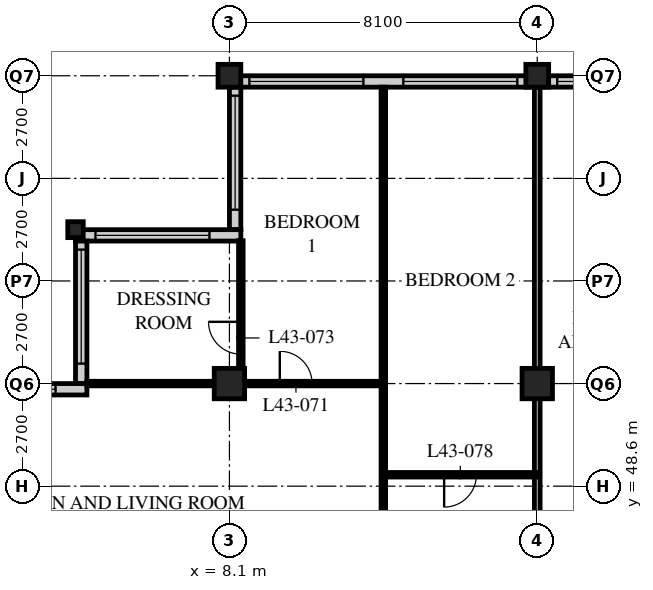
"""IFC4 building model, lengths in metres.
Left out: names, types, materials, properties, quantities, classifications, styles, units other than length and angle.
Written with IfcOpenShell. Run it as: python <this file> out.ifc"""

import sys

from ifc_helpers import new_model, si_unit, direction, frame, frame_2d, origin, origin_2d, place, context, subcontext, project, spatial, rectangle, hollow_rectangle, i_section, extrude, element, fill, save


model = new_model("IFC4")
c1 = context("Model", 3, precision=1e-05, world=origin(), true_north=direction((0.0, 1.0)))
c2 = subcontext(c1, "Body", "Model", "MODEL_VIEW")
j1 = project(units=[si_unit("LENGTHUNIT", "METRE"), si_unit("PLANEANGLEUNIT", "RADIAN")], contexts=[c1])
p1 = place(None, origin())
s1 = spatial("IfcSite", under=j1, at=p1, CompositionType="ELEMENT")
p2 = place(p1, origin())
s2 = spatial("IfcBuilding", under=s1, at=p2, CompositionType="ELEMENT")
p3 = place(p2, frame((0.0, 0.0, 170.4)))
s3 = spatial("IfcBuildingStorey", under=s2, at=p3, CompositionType="ELEMENT", Elevation=170.4)
p4 = place(p3, frame((4.05, 55.35, 0.0), z_axis=(0.0, 0.0, 1.0), x_axis=(1.0, 0.0, 0.0)))
e1 = element("IfcColumn", 1, at=p4, inside=s3, PredefinedType="COLUMN", context=c2, shape_type="SweptSolid", body=[
    extrude(i_section(OverallWidth=0.407, OverallDepth=0.419, WebThickness=0.031, FlangeThickness=0.049, FilletRadius=0.015, at=origin_2d()), origin(), (0.0, 0.0, 1.0), 3.6),
])
p5 = place(p3, frame((8.1, 51.3, 0.0), z_axis=(0.0, 0.0, 1.0), x_axis=(1.0, 0.0, 0.0)))
e2 = element("IfcColumn", 2, at=p5, inside=s3, PredefinedType="COLUMN", context=c2, shape_type="SweptSolid", body=[
    extrude(hollow_rectangle(XDim=0.8, YDim=0.8, WallThickness=0.08, at=origin_2d()), origin(), (0.0, 0.0, 1.0), 3.6),
])
p6 = place(p3, frame((8.1, 59.4, 0.0), z_axis=(0.0, 0.0, 1.0), x_axis=(1.0, 0.0, 0.0)))
e3 = element("IfcColumn", 3, at=p6, inside=s3, PredefinedType="COLUMN", context=c2, shape_type="SweptSolid", body=[
    extrude(hollow_rectangle(XDim=0.6, YDim=0.6, WallThickness=0.05, at=origin_2d()), origin(), (0.0, 0.0, 1.0), 3.6),
])
p7 = place(p3, frame((16.2, 51.3, 0.0), z_axis=(0.0, 0.0, 1.0), x_axis=(1.0, 0.0, 0.0)))
e4 = element("IfcColumn", 4, at=p7, inside=s3, PredefinedType="COLUMN", context=c2, shape_type="SweptSolid", body=[
    extrude(hollow_rectangle(XDim=0.8, YDim=0.8, WallThickness=0.08, at=origin_2d()), origin(), (0.0, 0.0, 1.0), 3.6),
])
p8 = place(p3, frame((16.2, 59.4, 0.0), z_axis=(0.0, 0.0, 1.0), x_axis=(1.0, 0.0, 0.0)))
e5 = element("IfcColumn", 5, at=p8, inside=s3, PredefinedType="COLUMN", context=c2, shape_type="SweptSolid", body=[
    extrude(hollow_rectangle(XDim=0.6, YDim=0.6, WallThickness=0.05, at=origin_2d()), origin(), (0.0, 0.0, 1.0), 3.6),
])
p9 = place(p3, frame((48.3, 59.25, 0.0), z_axis=(0.0, 0.0, 1.0), x_axis=(-1.0, 0.0, 0.0)))
e6 = element("IfcWall", 6, at=p9, inside=s3, PredefinedType="SOLIDWALL", context=c2, shape_type="SweptSolid", body=[
    extrude(rectangle(XDim=40.2, YDim=0.3, at=frame_2d((20.1, 0.0))), origin(), (0.0, 0.0, 1.0), 3.39),
])
p10 = place(p9, frame((0.225, 0.0, 0.6)))
e7 = element("IfcOpeningElement", 7, at=p10, cuts=e6, PredefinedType="OPENING", context=c2, shape_type="SweptSolid", body=[
    extrude(rectangle(XDim=3.0, YDim=2.4, at=frame_2d((1.5, 1.2))), frame((0.0, 0.16, 0.0), z_axis=(0.0, -1.0, 0.0), x_axis=(1.0, 0.0, 0.0)), (0.0, 0.0, 1.0), 0.32),
])
p11 = place(p9, frame((4.275, 0.0, 0.6)))
e8 = element("IfcOpeningElement", 8, at=p11, cuts=e6, PredefinedType="OPENING", context=c2, shape_type="SweptSolid", body=[
    extrude(rectangle(XDim=3.0, YDim=2.4, at=frame_2d((1.5, 1.2))), frame((0.0, 0.16, 0.0), z_axis=(0.0, -1.0, 0.0), x_axis=(1.0, 0.0, 0.0)), (0.0, 0.0, 1.0), 0.32),
])
p12 = place(p9, frame((8.325, 0.0, 0.6)))
e9 = element("IfcOpeningElement", 9, at=p12, cuts=e6, PredefinedType="OPENING", context=c2, shape_type="SweptSolid", body=[
    extrude(rectangle(XDim=3.0, YDim=2.4, at=frame_2d((1.5, 1.2))), frame((0.0, 0.16, 0.0), z_axis=(0.0, -1.0, 0.0), x_axis=(1.0, 0.0, 0.0)), (0.0, 0.0, 1.0), 0.32),
])
p13 = place(p9, frame((12.375, 0.0, 0.6)))
e10 = element("IfcOpeningElement", 10, at=p13, cuts=e6, PredefinedType="OPENING", context=c2, shape_type="SweptSolid", body=[
    extrude(rectangle(XDim=3.0, YDim=2.4, at=frame_2d((1.5, 1.2))), frame((0.0, 0.16, 0.0), z_axis=(0.0, -1.0, 0.0), x_axis=(1.0, 0.0, 0.0)), (0.0, 0.0, 1.0), 0.32),
])
p14 = place(p9, frame((16.425, 0.0, 0.6)))
e11 = element("IfcOpeningElement", 11, at=p14, cuts=e6, PredefinedType="OPENING", context=c2, shape_type="SweptSolid", body=[
    extrude(rectangle(XDim=3.0, YDim=2.4, at=frame_2d((1.5, 1.2))), frame((0.0, 0.16, 0.0), z_axis=(0.0, -1.0, 0.0), x_axis=(1.0, 0.0, 0.0)), (0.0, 0.0, 1.0), 0.32),
])
p15 = place(p9, frame((20.475, 0.0, 0.6)))
e12 = element("IfcOpeningElement", 12, at=p15, cuts=e6, PredefinedType="OPENING", context=c2, shape_type="SweptSolid", body=[
    extrude(rectangle(XDim=3.0, YDim=2.4, at=frame_2d((1.5, 1.2))), frame((0.0, 0.16, 0.0), z_axis=(0.0, -1.0, 0.0), x_axis=(1.0, 0.0, 0.0)), (0.0, 0.0, 1.0), 0.32),
])
p16 = place(p9, frame((24.525, 0.0, 0.6)))
e13 = element("IfcOpeningElement", 13, at=p16, cuts=e6, PredefinedType="OPENING", context=c2, shape_type="SweptSolid", body=[
    extrude(rectangle(XDim=3.0, YDim=2.4, at=frame_2d((1.5, 1.2))), frame((0.0, 0.16, 0.0), z_axis=(0.0, -1.0, 0.0), x_axis=(1.0, 0.0, 0.0)), (0.0, 0.0, 1.0), 0.32),
])
p17 = place(p9, frame((28.575, 0.0, 0.6)))
e14 = element("IfcOpeningElement", 14, at=p17, cuts=e6, PredefinedType="OPENING", context=c2, shape_type="SweptSolid", body=[
    extrude(rectangle(XDim=3.0, YDim=2.4, at=frame_2d((1.5, 1.2))), frame((0.0, 0.16, 0.0), z_axis=(0.0, -1.0, 0.0), x_axis=(1.0, 0.0, 0.0)), (0.0, 0.0, 1.0), 0.32),
])
p18 = place(p9, frame((32.625, 0.0, 0.6)))
e15 = element("IfcOpeningElement", 15, at=p18, cuts=e6, PredefinedType="OPENING", context=c2, shape_type="SweptSolid", body=[
    extrude(rectangle(XDim=3.0, YDim=2.4, at=frame_2d((1.5, 1.2))), frame((0.0, 0.16, 0.0), z_axis=(0.0, -1.0, 0.0), x_axis=(1.0, 0.0, 0.0)), (0.0, 0.0, 1.0), 0.32),
])
p19 = place(p9, frame((36.675, 0.0, 0.6)))
e16 = element("IfcOpeningElement", 16, at=p19, cuts=e6, PredefinedType="OPENING", context=c2, shape_type="SweptSolid", body=[
    extrude(rectangle(XDim=3.0, YDim=2.4, at=frame_2d((1.5, 1.2))), frame((0.0, 0.16, 0.0), z_axis=(0.0, -1.0, 0.0), x_axis=(1.0, 0.0, 0.0)), (0.0, 0.0, 1.0), 0.32),
])
p20 = place(p3, frame((8.25, 59.1, 0.0), z_axis=(0.0, 0.0, 1.0), x_axis=(0.0, -1.0, 0.0)))
e17 = element("IfcWall", 17, at=p20, inside=s3, PredefinedType="SOLIDWALL", context=c2, shape_type="SweptSolid", body=[
    extrude(rectangle(XDim=3.75, YDim=0.3, at=frame_2d((1.875, 0.0))), origin(), (0.0, 0.0, 1.0), 3.39),
])
p21 = place(p20, frame((0.225, 0.0, 0.6)))
e18 = element("IfcOpeningElement", 18, at=p21, cuts=e17, PredefinedType="OPENING", context=c2, shape_type="SweptSolid", body=[
    extrude(rectangle(XDim=3.0, YDim=2.0, at=frame_2d((1.5, 1.0))), frame((0.0, 0.16, 0.0), z_axis=(0.0, -1.0, 0.0), x_axis=(1.0, 0.0, 0.0)), (0.0, 0.0, 1.0), 0.32),
])
p22 = place(p3, frame((8.4, 55.2, 0.0), z_axis=(0.0, 0.0, 1.0), x_axis=(-1.0, 0.0, 0.0)))
e19 = element("IfcWall", 19, at=p22, inside=s3, PredefinedType="SOLIDWALL", context=c2, shape_type="SweptSolid", body=[
    extrude(rectangle(XDim=4.35, YDim=0.3, at=frame_2d((2.175, 0.0))), origin(), (0.0, 0.0, 1.0), 3.39),
])
p23 = place(p22, frame((0.825, 0.0, 0.6)))
e20 = element("IfcOpeningElement", 20, at=p23, cuts=e19, PredefinedType="OPENING", context=c2, shape_type="SweptSolid", body=[
    extrude(rectangle(XDim=3.0, YDim=2.0, at=frame_2d((1.5, 1.0))), frame((0.0, 0.16, 0.0), z_axis=(0.0, -1.0, 0.0), x_axis=(1.0, 0.0, 0.0)), (0.0, 0.0, 1.0), 0.32),
])
p24 = place(p3, frame((4.2, 55.05, 0.0), z_axis=(0.0, 0.0, 1.0), x_axis=(0.0, -1.0, 0.0)))
e21 = element("IfcWall", 21, at=p24, inside=s3, PredefinedType="SOLIDWALL", context=c2, shape_type="SweptSolid", body=[
    extrude(rectangle(XDim=3.75, YDim=0.3, at=frame_2d((1.875, 0.0))), origin(), (0.0, 0.0, 1.0), 3.39),
])
p25 = place(p24, frame((0.225, 0.0, 0.6)))
e22 = element("IfcOpeningElement", 22, at=p25, cuts=e21, PredefinedType="OPENING", context=c2, shape_type="SweptSolid", body=[
    extrude(rectangle(XDim=3.0, YDim=2.0, at=frame_2d((1.5, 1.0))), frame((0.0, 0.16, 0.0), z_axis=(0.0, -1.0, 0.0), x_axis=(1.0, 0.0, 0.0)), (0.0, 0.0, 1.0), 0.32),
])
p26 = place(p3, frame((4.35, 51.15, 0.0), z_axis=(0.0, 0.0, 1.0), x_axis=(-1.0, 0.0, 0.0)))
e23 = element("IfcWall", 23, at=p26, inside=s3, PredefinedType="SOLIDWALL", context=c2, shape_type="SweptSolid", body=[
    extrude(rectangle(XDim=4.35, YDim=0.3, at=frame_2d((2.175, 0.0))), origin(), (0.0, 0.0, 1.0), 3.39),
])
p27 = place(p26, frame((0.825, 0.0, 0.6)))
e24 = element("IfcOpeningElement", 24, at=p27, cuts=e23, PredefinedType="OPENING", context=c2, shape_type="SweptSolid", body=[
    extrude(rectangle(XDim=3.0, YDim=2.0, at=frame_2d((1.5, 1.0))), frame((0.0, 0.16, 0.0), z_axis=(0.0, -1.0, 0.0), x_axis=(1.0, 0.0, 0.0)), (0.0, 0.0, 1.0), 0.32),
])
p28 = place(p3, frame((12.15, 45.6, 0.0), z_axis=(0.0, 0.0, 1.0), x_axis=(0.0, 1.0, 0.0)))
e25 = element("IfcWall", 25, at=p28, inside=s3, PredefinedType="PARTITIONING", context=c2, shape_type="SweptSolid", body=[
    extrude(rectangle(XDim=13.5, YDim=0.12, at=frame_2d((6.75, 0.0))), origin(), (0.0, 0.0, 1.0), 3.39),
])
p29 = place(p3, frame((12.15, 51.3, 0.0), z_axis=(0.0, 0.0, 1.0), x_axis=(-1.0, 0.0, 0.0)))
e26 = element("IfcWall", 26, at=p29, inside=s3, PredefinedType="PARTITIONING", context=c2, shape_type="SweptSolid", body=[
    extrude(rectangle(XDim=7.8, YDim=0.12, at=frame_2d((3.9, 0.0))), origin(), (0.0, 0.0, 1.0), 2.778),
])
p30 = place(p29, frame((1.875, 0.0, 0.0)))
e27 = element("IfcOpeningElement", 27, at=p30, cuts=e26, PredefinedType="OPENING", context=c2, shape_type="SweptSolid", body=[
    extrude(rectangle(XDim=0.85, YDim=2.1, at=frame_2d((0.425, 1.05))), frame((0.0, 0.07, 0.0), z_axis=(0.0, -1.0, 0.0), x_axis=(1.0, 0.0, 0.0)), (0.0, 0.0, 1.0), 0.14),
])
p31 = place(p3, frame((16.2, 43.2, 0.0), z_axis=(0.0, 0.0, 1.0), x_axis=(0.0, 1.0, 0.0)))
e28 = element("IfcWall", 28, at=p31, inside=s3, PredefinedType="PARTITIONING", context=c2, shape_type="SweptSolid", body=[
    extrude(rectangle(XDim=15.9, YDim=0.15, at=frame_2d((7.95, 0.0))), origin(), (0.0, 0.0, 1.0), 2.778),
])
p32 = place(p3, frame((8.4, 55.06, 0.0), z_axis=(0.0, 0.0, 1.0), x_axis=(0.0, -1.0, 0.0)))
e29 = element("IfcWall", 29, at=p32, inside=s3, PredefinedType="PARTITIONING", context=c2, shape_type="SweptSolid", body=[
    extrude(rectangle(XDim=3.76, YDim=0.12, at=frame_2d((1.88, 0.0))), origin(), (0.0, 0.0, 1.0), 3.39),
])
p33 = place(p32, frame((2.135, 0.0, 0.0)))
e30 = element("IfcOpeningElement", 30, at=p33, cuts=e29, PredefinedType="OPENING", context=c2, shape_type="SweptSolid", body=[
    extrude(rectangle(XDim=0.85, YDim=2.1, at=frame_2d((0.425, 1.05))), frame((0.0, 0.07, 0.0), z_axis=(0.0, -1.0, 0.0), x_axis=(1.0, 0.0, 0.0)), (0.0, 0.0, 1.0), 0.14),
])
p34 = place(p3, frame((12.15, 48.9, 0.0), z_axis=(0.0, 0.0, 1.0), x_axis=(1.0, 0.0, 0.0)))
e31 = element("IfcWall", 31, at=p34, inside=s3, PredefinedType="PARTITIONING", context=c2, shape_type="SweptSolid", body=[
    extrude(rectangle(XDim=4.05, YDim=0.12, at=frame_2d((2.025, 0.0))), origin(), (0.0, 0.0, 1.0), 3.39),
])
p35 = place(p34, frame((1.6, 0.0, 0.0)))
e32 = element("IfcOpeningElement", 32, at=p35, cuts=e31, PredefinedType="OPENING", context=c2, shape_type="SweptSolid", body=[
    extrude(rectangle(XDim=0.85, YDim=2.1, at=frame_2d((0.425, 1.05))), frame((0.0, 0.07, 0.0), z_axis=(0.0, -1.0, 0.0), x_axis=(1.0, 0.0, 0.0)), (0.0, 0.0, 1.0), 0.14),
])
p36 = place(p17, origin())
e33 = element("IfcWindow", 33, at=p36, inside=s3, PartitioningType="SINGLE_PANEL", PredefinedType="WINDOW", context=c2, shape_type="SweptSolid", body=[
    extrude(rectangle(XDim=3.0, YDim=2.4, at=frame_2d((1.5, 1.2))), frame((0.0, 0.03, 0.0), z_axis=(0.0, -1.0, 0.0), x_axis=(1.0, 0.0, 0.0)), (0.0, 0.0, 1.0), 0.06),
])
fill(e14, e33)
p37 = place(p18, origin())
e34 = element("IfcWindow", 34, at=p37, inside=s3, PartitioningType="SINGLE_PANEL", PredefinedType="WINDOW", context=c2, shape_type="SweptSolid", body=[
    extrude(rectangle(XDim=3.0, YDim=2.4, at=frame_2d((1.5, 1.2))), frame((0.0, 0.03, 0.0), z_axis=(0.0, -1.0, 0.0), x_axis=(1.0, 0.0, 0.0)), (0.0, 0.0, 1.0), 0.06),
])
fill(e15, e34)
p38 = place(p19, origin())
e35 = element("IfcWindow", 35, at=p38, inside=s3, PartitioningType="SINGLE_PANEL", PredefinedType="WINDOW", context=c2, shape_type="SweptSolid", body=[
    extrude(rectangle(XDim=3.0, YDim=2.4, at=frame_2d((1.5, 1.2))), frame((0.0, 0.03, 0.0), z_axis=(0.0, -1.0, 0.0), x_axis=(1.0, 0.0, 0.0)), (0.0, 0.0, 1.0), 0.06),
])
fill(e16, e35)
p39 = place(p21, origin())
e36 = element("IfcWindow", 36, at=p39, inside=s3, PartitioningType="SINGLE_PANEL", PredefinedType="WINDOW", context=c2, shape_type="SweptSolid", body=[
    extrude(rectangle(XDim=3.0, YDim=2.0, at=frame_2d((1.5, 1.0))), frame((0.0, 0.03, 0.0), z_axis=(0.0, -1.0, 0.0), x_axis=(1.0, 0.0, 0.0)), (0.0, 0.0, 1.0), 0.06),
])
fill(e18, e36)
p40 = place(p23, origin())
e37 = element("IfcWindow", 37, at=p40, inside=s3, PartitioningType="SINGLE_PANEL", PredefinedType="WINDOW", context=c2, shape_type="SweptSolid", body=[
    extrude(rectangle(XDim=3.0, YDim=2.0, at=frame_2d((1.5, 1.0))), frame((0.0, 0.03, 0.0), z_axis=(0.0, -1.0, 0.0), x_axis=(1.0, 0.0, 0.0)), (0.0, 0.0, 1.0), 0.06),
])
fill(e20, e37)
p41 = place(p25, origin())
e38 = element("IfcWindow", 38, at=p41, inside=s3, PartitioningType="SINGLE_PANEL", PredefinedType="WINDOW", context=c2, shape_type="SweptSolid", body=[
    extrude(rectangle(XDim=3.0, YDim=2.0, at=frame_2d((1.5, 1.0))), frame((0.0, 0.03, 0.0), z_axis=(0.0, -1.0, 0.0), x_axis=(1.0, 0.0, 0.0)), (0.0, 0.0, 1.0), 0.06),
])
fill(e22, e38)
p42 = place(p27, origin())
e39 = element("IfcWindow", 39, at=p42, inside=s3, PartitioningType="SINGLE_PANEL", PredefinedType="WINDOW", context=c2, shape_type="SweptSolid", body=[
    extrude(rectangle(XDim=3.0, YDim=2.0, at=frame_2d((1.5, 1.0))), frame((0.0, 0.03, 0.0), z_axis=(0.0, -1.0, 0.0), x_axis=(1.0, 0.0, 0.0)), (0.0, 0.0, 1.0), 0.06),
])
fill(e24, e39)
p43 = place(p30, origin())
e40 = element("IfcDoor", 40, at=p43, inside=s3, OperationType="SINGLE_SWING_LEFT", PredefinedType="DOOR", context=c2, shape_type="SweptSolid", body=[
    extrude(rectangle(XDim=0.85, YDim=2.1, at=frame_2d((0.425, 1.05))), frame((0.0, 0.025, 0.0), z_axis=(0.0, -1.0, 0.0), x_axis=(1.0, 0.0, 0.0)), (0.0, 0.0, 1.0), 0.05),
])
fill(e27, e40)
p44 = place(p33, origin())
e41 = element("IfcDoor", 41, at=p44, inside=s3, OperationType="SINGLE_SWING_RIGHT", PredefinedType="DOOR", context=c2, shape_type="SweptSolid", body=[
    extrude(rectangle(XDim=0.85, YDim=2.1, at=frame_2d((0.425, 1.05))), frame((0.0, 0.025, 0.0), z_axis=(0.0, -1.0, 0.0), x_axis=(1.0, 0.0, 0.0)), (0.0, 0.0, 1.0), 0.05),
])
fill(e30, e41)
p45 = place(p35, origin())
e42 = element("IfcDoor", 42, at=p45, inside=s3, OperationType="SINGLE_SWING_RIGHT", PredefinedType="DOOR", context=c2, shape_type="SweptSolid", body=[
    extrude(rectangle(XDim=0.85, YDim=2.1, at=frame_2d((0.425, 1.05))), frame((0.0, 0.025, 0.0), z_axis=(0.0, -1.0, 0.0), x_axis=(1.0, 0.0, 0.0)), (0.0, 0.0, 1.0), 0.05),
])
fill(e32, e42)
save(model, sys.argv[1])
